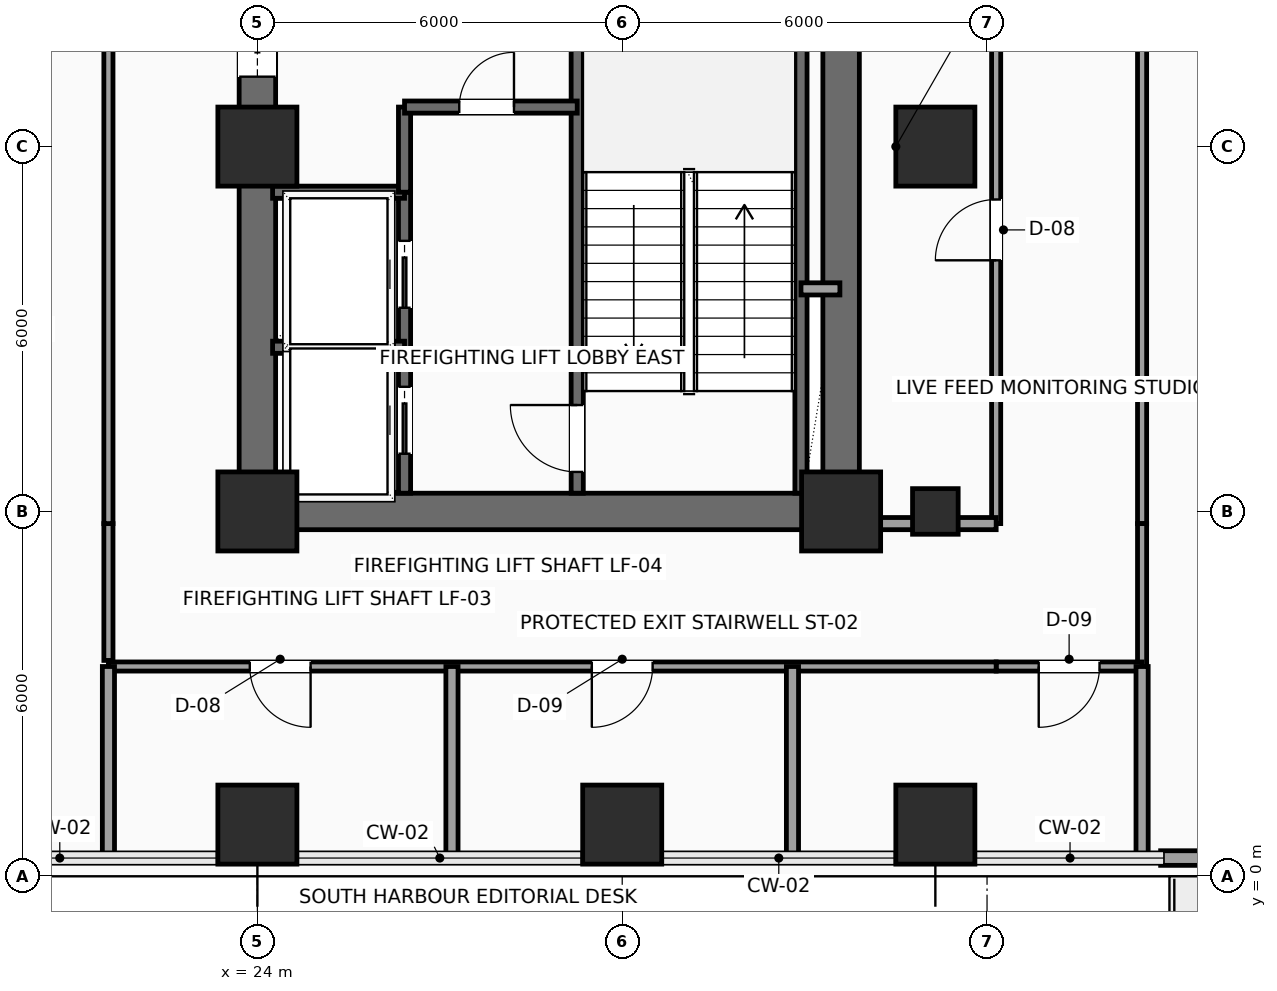
"""IFC4 building model, lengths in metres.
Left out: names, types, materials, properties, quantities, classifications, styles, units other than length and angle.
Written with IfcOpenShell. Run it as: python <this file> out.ifc"""

import sys

from ifc_helpers import new_model, si_unit, direction, frame, frame_2d, origin, origin_2d, place, context, subcontext, project, spatial, rectangle, hollow_rectangle, extrude, element, fill, save


model = new_model("IFC4")
c1 = context("Model", 3, precision=1e-05, world=origin(), true_north=direction((0.0, 1.0)))
c2 = subcontext(c1, "Body", "Model", "MODEL_VIEW")
j1 = project(units=[si_unit("LENGTHUNIT", "METRE"), si_unit("PLANEANGLEUNIT", "RADIAN")], contexts=[c1])
p1 = place(None, origin())
s1 = spatial("IfcSite", under=j1, at=p1, CompositionType="ELEMENT")
p2 = place(p1, origin())
s2 = spatial("IfcBuilding", under=s1, at=p2, CompositionType="ELEMENT")
p3 = place(p2, frame((0.0, 0.0, 75.3)))
s3 = spatial("IfcBuildingStorey", under=s2, at=p3, CompositionType="ELEMENT", Elevation=75.3)
for number, where, z_axis, x_axis in (
    (1, (24.0, 6.0, 0.0), (0.0, 0.0, 1.0), (1.0, 0.0, 0.0)),
    (2, (24.0, 12.0, 0.0), (0.0, 0.0, 1.0), (1.0, 0.0, 0.0)),
    (3, (33.6, 6.0, 0.0), (0.0, 0.0, 1.0), (1.0, 0.0, 0.0)),
    (4, (24.0, 0.85, 0.0), (0.0, 0.0, 1.0), (1.0, 0.0, 0.0)),
    (5, (30.0, 0.85, 0.0), (0.0, 0.0, 1.0), (1.0, 0.0, 0.0)),
    (6, (35.15, 0.85, 0.0), (0.0, 0.0, 1.0), (1.0, 0.0, 0.0)),
):
    element("IfcColumn", number, at=place(p3, frame(where, z_axis=z_axis, x_axis=x_axis)), inside=s3, PredefinedType="COLUMN", context=c2, shape_type="SweptSolid", body=[
        extrude(rectangle(XDim=1.3, YDim=1.3, at=origin_2d()), origin(), (0.0, 0.0, 1.0), 3.9),
    ])
p4 = place(p3, frame((35.15, 6.0, 0.0), z_axis=(0.0, 0.0, 1.0), x_axis=(1.0, 0.0, 0.0)))
e7 = element("IfcColumn", 7, at=p4, inside=s3, PredefinedType="COLUMN", context=c2, shape_type="SweptSolid", body=[
    extrude(hollow_rectangle(XDim=0.75, YDim=0.75, WallThickness=0.035, InnerFilletRadius=0.035, OuterFilletRadius=0.05, at=origin_2d()), origin(), (0.0, 0.0, 1.0), 3.9),
])
p5 = place(p3, frame((35.15, 12.0, 0.0), z_axis=(0.0, 0.0, 1.0), x_axis=(1.0, 0.0, 0.0)))
e8 = element("IfcColumn", 8, at=p5, inside=s3, PredefinedType="COLUMN", context=c2, shape_type="SweptSolid", body=[
    extrude(rectangle(XDim=1.3, YDim=1.3, at=origin_2d()), origin(), (0.0, 0.0, 1.0), 3.9),
])
p6 = place(p3, frame((48.145, 0.3, 0.0), z_axis=(0.0, 0.0, 1.0), x_axis=(-1.0, 0.0, 0.0)))
e9 = element("IfcWall", 9, at=p6, inside=s3, PredefinedType="SOLIDWALL", context=c2, shape_type="SweptSolid", body=[
    extrude(rectangle(XDim=9.29, YDim=0.24, at=frame_2d((4.645, 0.0))), origin(), (0.0, 0.0, 1.0), 3.65),
])
p7 = place(p6, frame((3.945, 0.0, 0.0)))
e10 = element("IfcOpeningElement", 10, at=p7, cuts=e9, PredefinedType="OPENING", context=c2, shape_type="SweptSolid", body=[
    extrude(rectangle(XDim=1.05, YDim=2.2, at=frame_2d((0.525, 1.1))), frame((0.0, 0.13, 0.0), z_axis=(0.0, -1.0, 0.0), x_axis=(1.0, 0.0, 0.0)), (0.0, 0.0, 1.0), 0.26),
])
p8 = place(p3, frame((24.0, 6.0, 0.0), z_axis=(0.0, 0.0, 1.0), x_axis=(1.0, 0.0, 0.0)))
e11 = element("IfcWall", 11, at=p8, inside=s3, PredefinedType="SHEAR", context=c2, shape_type="SweptSolid", body=[
    extrude(rectangle(XDim=9.6, YDim=0.6, at=frame_2d((4.8, 0.0))), origin(), (0.0, 0.0, 1.0), 3.65),
])
p9 = place(p3, frame((24.0, 6.0, 0.0), z_axis=(0.0, 0.0, 1.0), x_axis=(0.0, 1.0, 0.0)))
e12 = element("IfcWall", 12, at=p9, inside=s3, PredefinedType="SHEAR", context=c2, shape_type="SweptSolid", body=[
    extrude(rectangle(XDim=12.0, YDim=0.6, at=frame_2d((6.0, 0.0))), origin(), (0.0, 0.0, 1.0), 3.65),
])
p10 = place(p9, frame((7.15, 0.0, 0.0)))
e13 = element("IfcOpeningElement", 13, at=p10, cuts=e12, PredefinedType="OPENING", context=c2, shape_type="SweptSolid", body=[
    extrude(rectangle(XDim=1.6, YDim=2.3, at=frame_2d((0.8, 1.15))), frame((0.0, 0.31, 0.0), z_axis=(0.0, -1.0, 0.0), x_axis=(1.0, 0.0, 0.0)), (0.0, 0.0, 1.0), 0.62),
])
p11 = place(p3, frame((33.6, 6.0, 0.0), z_axis=(0.0, 0.0, 1.0), x_axis=(0.0, 1.0, 0.0)))
e14 = element("IfcWall", 14, at=p11, inside=s3, PredefinedType="SHEAR", context=c2, shape_type="SweptSolid", body=[
    extrude(rectangle(XDim=12.0, YDim=0.6, at=frame_2d((6.0, 0.0))), origin(), (0.0, 0.0, 1.0), 3.65),
])
p12 = place(p11, frame((10.2, 0.0, 0.0)))
e15 = element("IfcOpeningElement", 15, at=p12, cuts=e14, PredefinedType="OPENING", context=c2, shape_type="SweptSolid", body=[
    extrude(rectangle(XDim=0.9, YDim=2.15, at=frame_2d((0.45, 1.075))), frame((0.0, 0.31, 0.0), z_axis=(0.0, -1.0, 0.0), x_axis=(1.0, 0.0, 0.0)), (0.0, 0.0, 1.0), 0.62),
])
p13 = place(p3, frame((29.26, 6.3, 0.0), z_axis=(0.0, 0.0, 1.0), x_axis=(0.0, 1.0, 0.0)))
e16 = element("IfcWall", 16, at=p13, inside=s3, PredefinedType="SHEAR", context=c2, shape_type="SweptSolid", body=[
    extrude(rectangle(XDim=8.88, YDim=0.2, at=frame_2d((4.44, 0.0))), origin(), (0.0, 0.0, 1.0), 3.65),
])
p14 = place(p13, frame((0.35, 0.0, 0.0)))
e17 = element("IfcOpeningElement", 17, at=p14, cuts=e16, PredefinedType="OPENING", context=c2, shape_type="SweptSolid", body=[
    extrude(rectangle(XDim=1.1, YDim=2.2, at=frame_2d((0.55, 1.1))), frame((0.0, 0.11, 0.0), z_axis=(0.0, -1.0, 0.0), x_axis=(1.0, 0.0, 0.0)), (0.0, 0.0, 1.0), 0.22),
])
p15 = place(p3, frame((32.94, 6.3, 0.0), z_axis=(0.0, 0.0, 1.0), x_axis=(0.0, 1.0, 0.0)))
e18 = element("IfcWall", 18, at=p15, inside=s3, PredefinedType="SHEAR", context=c2, shape_type="SweptSolid", body=[
    extrude(rectangle(XDim=8.88, YDim=0.2, at=frame_2d((4.44, 0.0))), origin(), (0.0, 0.0, 1.0), 3.65),
])
p16 = place(p3, frame((26.42, 6.3, 0.0), z_axis=(0.0, 0.0, 1.0), x_axis=(0.0, 1.0, 0.0)))
e19 = element("IfcWall", 19, at=p16, inside=s3, PredefinedType="SHEAR", context=c2, shape_type="SweptSolid", body=[
    extrude(rectangle(XDim=4.95, YDim=0.2, at=frame_2d((2.475, 0.0))), origin(), (0.0, 0.0, 1.0), 3.65),
])
p17 = place(p16, frame((0.65, 0.0, 0.0)))
e20 = element("IfcOpeningElement", 20, at=p17, cuts=e19, PredefinedType="OPENING", context=c2, shape_type="SweptSolid", body=[
    extrude(rectangle(XDim=1.1, YDim=2.2, at=frame_2d((0.55, 1.1))), frame((0.0, 0.11, 0.0), z_axis=(0.0, -1.0, 0.0), x_axis=(1.0, 0.0, 0.0)), (0.0, 0.0, 1.0), 0.22),
])
p18 = place(p16, frame((3.05, 0.0, 0.0)))
e21 = element("IfcOpeningElement", 21, at=p18, cuts=e19, PredefinedType="OPENING", context=c2, shape_type="SweptSolid", body=[
    extrude(rectangle(XDim=1.1, YDim=2.2, at=frame_2d((0.55, 1.1))), frame((0.0, 0.11, 0.0), z_axis=(0.0, -1.0, 0.0), x_axis=(1.0, 0.0, 0.0)), (0.0, 0.0, 1.0), 0.22),
])
for number, where, z_axis, x_axis in (
    (22, (24.25, 8.7, 0.0), (0.0, 0.0, 1.0), (1.0, 0.0, 0.0)),
    (23, (24.25, 11.25, 0.0), (0.0, 0.0, 1.0), (1.0, 0.0, 0.0)),
):
    element("IfcWall", number, at=place(p3, frame(where, z_axis=z_axis, x_axis=x_axis)), inside=s3, PredefinedType="SHEAR", context=c2, shape_type="SweptSolid", body=[
        extrude(rectangle(XDim=2.17, YDim=0.2, at=frame_2d((1.085, 0.0))), origin(), (0.0, 0.0, 1.0), 3.65),
    ])
p19 = place(p3, frame((26.42, 11.25, 0.0), z_axis=(0.0, 0.0, 1.0), x_axis=(0.0, 1.0, 0.0)))
e24 = element("IfcWall", 24, at=p19, inside=s3, PredefinedType="SHEAR", context=c2, shape_type="SweptSolid", body=[
    extrude(rectangle(XDim=1.4, YDim=0.2, at=frame_2d((0.7, 0.0))), origin(), (0.0, 0.0, 1.0), 3.65),
])
p20 = place(p3, frame((26.42, 12.65, 0.0), z_axis=(0.0, 0.0, 1.0), x_axis=(1.0, 0.0, 0.0)))
e25 = element("IfcWall", 25, at=p20, inside=s3, PredefinedType="SHEAR", context=c2, shape_type="SweptSolid", body=[
    extrude(rectangle(XDim=2.84, YDim=0.2, at=frame_2d((1.42, 0.0))), origin(), (0.0, 0.0, 1.0), 3.65),
])
p21 = place(p20, frame((0.9, 0.0, 0.0)))
e26 = element("IfcOpeningElement", 26, at=p21, cuts=e25, PredefinedType="OPENING", context=c2, shape_type="SweptSolid", body=[
    extrude(rectangle(XDim=0.9, YDim=2.15, at=frame_2d((0.45, 1.075))), frame((0.0, 0.11, 0.0), z_axis=(0.0, -1.0, 0.0), x_axis=(1.0, 0.0, 0.0)), (0.0, 0.0, 1.0), 0.22),
])
p22 = place(p3, frame((32.94, 9.66, 0.0), z_axis=(0.0, 0.0, 1.0), x_axis=(1.0, 0.0, 0.0)))
e27 = element("IfcWall", 27, at=p22, inside=s3, PredefinedType="SOLIDWALL", context=c2, shape_type="SweptSolid", body=[
    extrude(rectangle(XDim=0.64, YDim=0.2, at=frame_2d((0.32, 0.0))), origin(), (0.0, 0.0, 1.0), 3.65),
])
p23 = place(p3, frame((36.15, 5.8, 0.0), z_axis=(0.0, 0.0, 1.0), x_axis=(0.0, 1.0, 0.0)))
e28 = element("IfcWall", 28, at=p23, inside=s3, PredefinedType="PARTITIONING", context=c2, shape_type="SweptSolid", body=[
    extrude(rectangle(XDim=10.08, YDim=0.15, at=frame_2d((5.04, 0.0))), origin(), (0.0, 0.0, 1.0), 3.65),
])
p24 = place(p23, frame((4.33, 0.0, 0.0)))
e29 = element("IfcOpeningElement", 29, at=p24, cuts=e28, PredefinedType="OPENING", context=c2, shape_type="SweptSolid", body=[
    extrude(rectangle(XDim=1.0, YDim=2.2, at=frame_2d((0.5, 1.1))), frame((0.0, 0.085, 0.0), z_axis=(0.0, -1.0, 0.0), x_axis=(1.0, 0.0, 0.0)), (0.0, 0.0, 1.0), 0.17),
])
p25 = place(p3, frame((38.55, 14.2, 0.0), z_axis=(0.0, 0.0, 1.0), x_axis=(0.0, -1.0, 0.0)))
e30 = element("IfcWall", 30, at=p25, inside=s3, PredefinedType="PARTITIONING", context=c2, shape_type="SweptSolid", body=[
    extrude(rectangle(XDim=8.4, YDim=0.15, at=frame_2d((4.2, 0.0))), origin(), (0.0, 0.0, 1.0), 3.65),
])
p26 = place(p3, frame((38.55, 5.8, 0.0), z_axis=(0.0, 0.0, 1.0), x_axis=(0.0, -1.0, 0.0)))
e31 = element("IfcWall", 31, at=p26, inside=s3, PredefinedType="PARTITIONING", context=c2, shape_type="SweptSolid", body=[
    extrude(rectangle(XDim=2.35, YDim=0.15, at=frame_2d((1.175, 0.0))), origin(), (0.0, 0.0, 1.0), 3.65),
])
p27 = place(p3, frame((38.55, 3.45, 0.0), z_axis=(0.0, 0.0, 1.0), x_axis=(-1.0, 0.0, 0.0)))
e32 = element("IfcWall", 32, at=p27, inside=s3, PredefinedType="PARTITIONING", context=c2, shape_type="SweptSolid", body=[
    extrude(rectangle(XDim=2.4, YDim=0.15, at=frame_2d((1.2, 0.0))), origin(), (0.0, 0.0, 1.0), 3.142),
])
p28 = place(p27, frame((0.7, 0.0, 0.0)))
e33 = element("IfcOpeningElement", 33, at=p28, cuts=e32, PredefinedType="OPENING", context=c2, shape_type="SweptSolid", body=[
    extrude(rectangle(XDim=1.0, YDim=2.2, at=frame_2d((0.5, 1.1))), frame((0.0, 0.085, 0.0), z_axis=(0.0, -1.0, 0.0), x_axis=(1.0, 0.0, 0.0)), (0.0, 0.0, 1.0), 0.17),
])
p29 = place(p3, frame((36.15, 3.45, 0.0), z_axis=(0.0, 0.0, 1.0), x_axis=(-1.0, 0.0, 0.0)))
e34 = element("IfcWall", 34, at=p29, inside=s3, PredefinedType="PARTITIONING", context=c2, shape_type="SweptSolid", body=[
    extrude(rectangle(XDim=14.6, YDim=0.15, at=frame_2d((7.3, 0.0))), origin(), (0.0, 0.0, 1.0), 3.142),
])
p30 = place(p29, frame((11.275, 0.0, 0.0)))
e35 = element("IfcOpeningElement", 35, at=p30, cuts=e34, PredefinedType="OPENING", context=c2, shape_type="SweptSolid", body=[
    extrude(rectangle(XDim=1.0, YDim=2.2, at=frame_2d((0.5, 1.1))), frame((0.0, 0.085, 0.0), z_axis=(0.0, -1.0, 0.0), x_axis=(1.0, 0.0, 0.0)), (0.0, 0.0, 1.0), 0.17),
])
p31 = place(p29, frame((5.65, 0.0, 0.0)))
e36 = element("IfcOpeningElement", 36, at=p31, cuts=e34, PredefinedType="OPENING", context=c2, shape_type="SweptSolid", body=[
    extrude(rectangle(XDim=1.0, YDim=2.2, at=frame_2d((0.5, 1.1))), frame((0.0, 0.085, 0.0), z_axis=(0.0, -1.0, 0.0), x_axis=(1.0, 0.0, 0.0)), (0.0, 0.0, 1.0), 0.17),
])
p32 = place(p3, frame((21.55, 3.55, 0.0), z_axis=(0.0, 0.0, 1.0), x_axis=(0.0, 1.0, 0.0)))
e37 = element("IfcWall", 37, at=p32, inside=s3, PredefinedType="PARTITIONING", context=c2, shape_type="SweptSolid", body=[
    extrude(rectangle(XDim=2.25, YDim=0.15, at=frame_2d((1.125, 0.0))), origin(), (0.0, 0.0, 1.0), 3.65),
])
p33 = place(p3, frame((21.55, 5.8, 0.0), z_axis=(0.0, 0.0, 1.0), x_axis=(0.0, 1.0, 0.0)))
e38 = element("IfcWall", 38, at=p33, inside=s3, PredefinedType="PARTITIONING", context=c2, shape_type="SweptSolid", body=[
    extrude(rectangle(XDim=8.75, YDim=0.15, at=frame_2d((4.375, 0.0))), origin(), (0.0, 0.0, 1.0), 3.65),
])
for number, where, z_axis, x_axis in (
    (39, (21.55, 0.3, 0.0), (0.0, 0.0, 1.0), (0.0, 1.0, 0.0)),
    (40, (27.2, 0.3, 0.0), (0.0, 0.0, 1.0), (0.0, 1.0, 0.0)),
    (41, (32.8, 0.3, 0.0), (0.0, 0.0, 1.0), (0.0, 1.0, 0.0)),
    (42, (38.55, 0.3, 0.0), (0.0, 0.0, 1.0), (0.0, 1.0, 0.0)),
):
    element("IfcWall", number, at=place(p3, frame(where, z_axis=z_axis, x_axis=x_axis)), inside=s3, PredefinedType="PARTITIONING", context=c2, shape_type="SweptSolid", body=[
        extrude(rectangle(XDim=3.15, YDim=0.2, at=frame_2d((1.575, 0.0))), origin(), (0.0, 0.0, 1.0), 3.65),
    ])
p34 = place(p3, frame((33.65, 5.8, 0.0), z_axis=(0.0, 0.0, 1.0), x_axis=(1.0, 0.0, 0.0)))
e43 = element("IfcWall", 43, at=p34, inside=s3, PredefinedType="PARTITIONING", context=c2, shape_type="SweptSolid", body=[
    extrude(rectangle(XDim=2.5, YDim=0.2, at=frame_2d((1.25, 0.0))), origin(), (0.0, 0.0, 1.0), 2.992),
])
p35 = place(p10, origin())
e44 = element("IfcDoor", 44, at=p35, inside=s3, OperationType="DOUBLE_DOOR_SLIDING", PredefinedType="DOOR", context=c2, shape_type="SweptSolid", body=[
    extrude(rectangle(XDim=1.6, YDim=2.3, at=frame_2d((0.8, 1.15))), frame((0.0, 0.025, 0.0), z_axis=(0.0, -1.0, 0.0), x_axis=(1.0, 0.0, 0.0)), (0.0, 0.0, 1.0), 0.05),
])
fill(e13, e44)
p36 = place(p14, origin())
e45 = element("IfcDoor", 45, at=p36, inside=s3, OperationType="SINGLE_SWING_RIGHT", PredefinedType="DOOR", context=c2, shape_type="SweptSolid", body=[
    extrude(rectangle(XDim=1.1, YDim=2.2, at=frame_2d((0.55, 1.1))), frame((0.0, 0.025, 0.0), z_axis=(0.0, -1.0, 0.0), x_axis=(1.0, 0.0, 0.0)), (0.0, 0.0, 1.0), 0.05),
])
fill(e17, e45)
p37 = place(p17, origin())
e46 = element("IfcDoor", 46, at=p37, inside=s3, OperationType="SLIDING_TO_LEFT", PredefinedType="DOOR", context=c2, shape_type="SweptSolid", body=[
    extrude(rectangle(XDim=1.1, YDim=2.2, at=frame_2d((0.55, 1.1))), frame((0.0, 0.025, 0.0), z_axis=(0.0, -1.0, 0.0), x_axis=(1.0, 0.0, 0.0)), (0.0, 0.0, 1.0), 0.05),
])
fill(e20, e46)
p38 = place(p18, origin())
e47 = element("IfcDoor", 47, at=p38, inside=s3, OperationType="SLIDING_TO_LEFT", PredefinedType="DOOR", context=c2, shape_type="SweptSolid", body=[
    extrude(rectangle(XDim=1.1, YDim=2.2, at=frame_2d((0.55, 1.1))), frame((0.0, 0.025, 0.0), z_axis=(0.0, -1.0, 0.0), x_axis=(1.0, 0.0, 0.0)), (0.0, 0.0, 1.0), 0.05),
])
fill(e21, e47)
p39 = place(p21, origin())
e48 = element("IfcDoor", 48, at=p39, inside=s3, OperationType="SINGLE_SWING_RIGHT", PredefinedType="DOOR", context=c2, shape_type="SweptSolid", body=[
    extrude(rectangle(XDim=0.9, YDim=2.15, at=frame_2d((0.45, 1.075))), frame((0.0, 0.025, 0.0), z_axis=(0.0, -1.0, 0.0), x_axis=(1.0, 0.0, 0.0)), (0.0, 0.0, 1.0), 0.05),
])
fill(e26, e48)
p40 = place(p24, origin())
e49 = element("IfcDoor", 49, at=p40, inside=s3, OperationType="SINGLE_SWING_LEFT", PredefinedType="DOOR", context=c2, shape_type="SweptSolid", body=[
    extrude(rectangle(XDim=1.0, YDim=2.2, at=frame_2d((0.5, 1.1))), frame((0.0, 0.025, 0.0), z_axis=(0.0, -1.0, 0.0), x_axis=(1.0, 0.0, 0.0)), (0.0, 0.0, 1.0), 0.05),
])
fill(e29, e49)
p41 = place(p28, origin())
e50 = element("IfcDoor", 50, at=p41, inside=s3, OperationType="SINGLE_SWING_RIGHT", PredefinedType="DOOR", context=c2, shape_type="SweptSolid", body=[
    extrude(rectangle(XDim=1.0, YDim=2.2, at=frame_2d((0.5, 1.1))), frame((0.0, 0.025, 0.0), z_axis=(0.0, -1.0, 0.0), x_axis=(1.0, 0.0, 0.0)), (0.0, 0.0, 1.0), 0.05),
])
fill(e33, e50)
p42 = place(p30, origin())
e51 = element("IfcDoor", 51, at=p42, inside=s3, OperationType="SINGLE_SWING_LEFT", PredefinedType="DOOR", context=c2, shape_type="SweptSolid", body=[
    extrude(rectangle(XDim=1.0, YDim=2.2, at=frame_2d((0.5, 1.1))), frame((0.0, 0.025, 0.0), z_axis=(0.0, -1.0, 0.0), x_axis=(1.0, 0.0, 0.0)), (0.0, 0.0, 1.0), 0.05),
])
fill(e35, e51)
p43 = place(p31, origin())
e52 = element("IfcDoor", 52, at=p43, inside=s3, OperationType="SINGLE_SWING_RIGHT", PredefinedType="DOOR", context=c2, shape_type="SweptSolid", body=[
    extrude(rectangle(XDim=1.0, YDim=2.2, at=frame_2d((0.5, 1.1))), frame((0.0, 0.025, 0.0), z_axis=(0.0, -1.0, 0.0), x_axis=(1.0, 0.0, 0.0)), (0.0, 0.0, 1.0), 0.05),
])
fill(e36, e52)
save(model, sys.argv[1])
